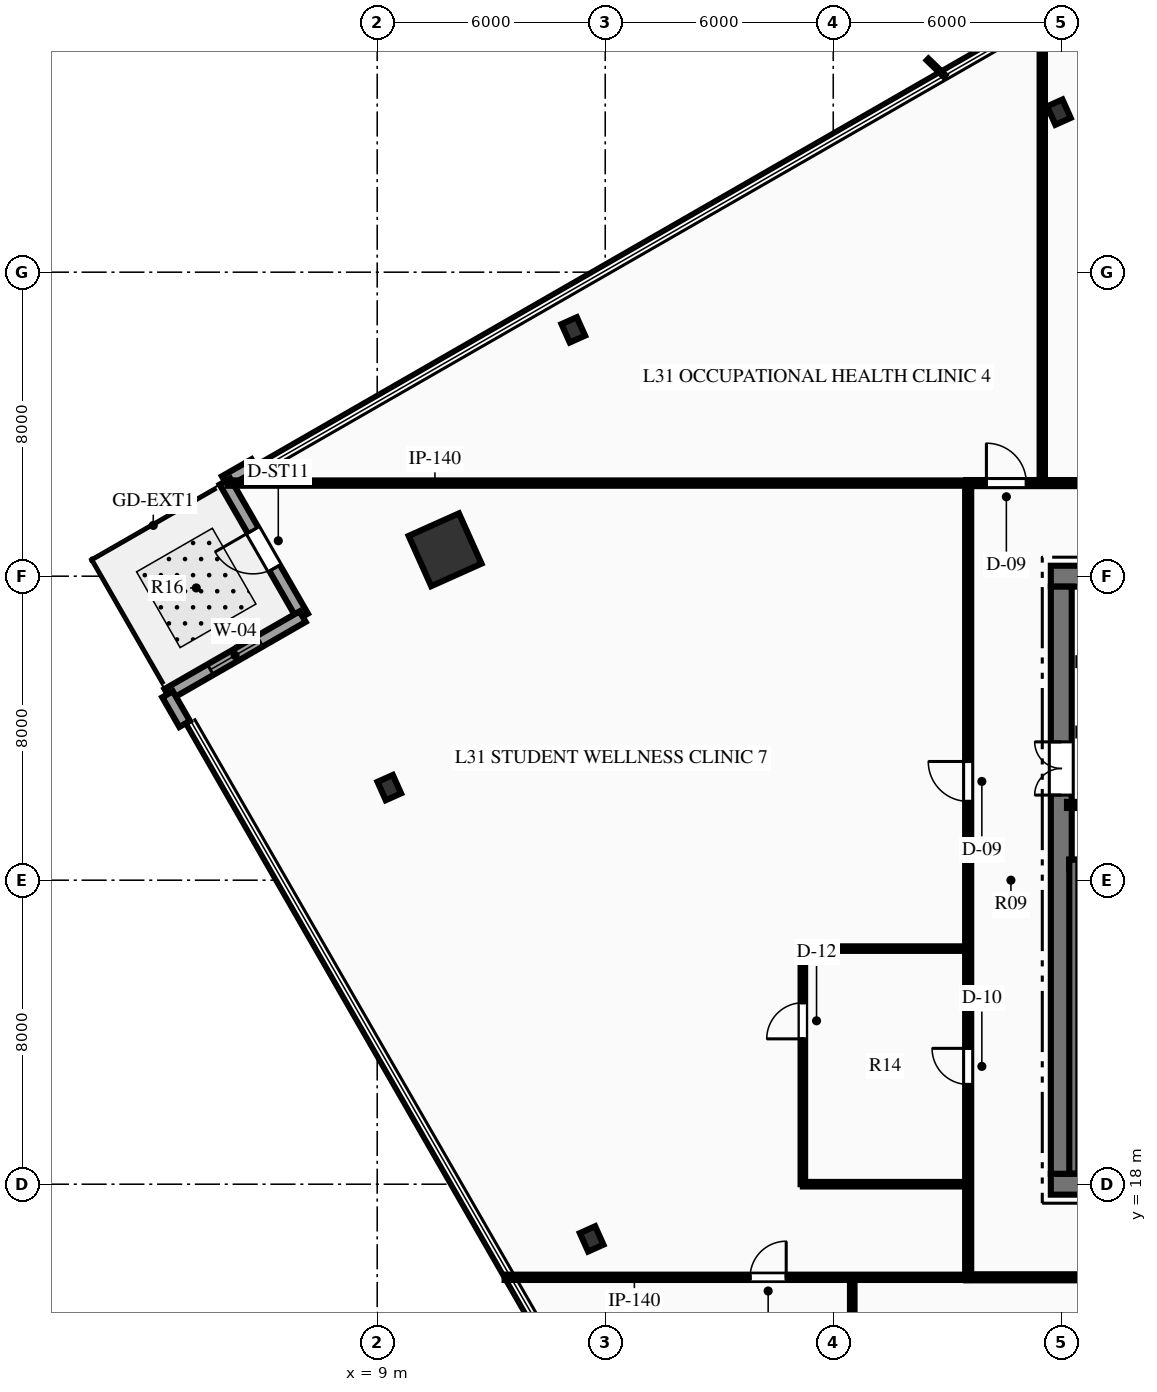
"""IFC4 building model, lengths in metres.
Left out: names, types, materials, properties, quantities, classifications, styles, units other than length and angle.
Written with IfcOpenShell. Run it as: python <this file> out.ifc"""

import sys

from ifc_helpers import new_model, si_unit, direction, frame, frame_2d, origin, origin_2d, place, context, subcontext, project, spatial, rectangle, hollow_rectangle, i_section, extrude, element, fill, save


model = new_model("IFC4")
c1 = context("Model", 3, precision=1e-05, world=origin(), true_north=direction((0.0, 1.0)))
c2 = subcontext(c1, "Body", "Model", "MODEL_VIEW")
j1 = project(units=[si_unit("LENGTHUNIT", "METRE"), si_unit("PLANEANGLEUNIT", "RADIAN")], contexts=[c1])
p1 = place(None, origin())
s1 = spatial("IfcSite", under=j1, at=p1, CompositionType="ELEMENT")
p2 = place(p1, origin())
s2 = spatial("IfcBuilding", under=s1, at=p2, CompositionType="ELEMENT")
p3 = place(p2, frame((0.0, 0.0, 127.95)))
s3 = spatial("IfcBuildingStorey", under=s2, at=p3, CompositionType="ELEMENT", Elevation=127.95)
p4 = place(p3, frame((26.725, 18.0, 0.0), z_axis=(0.0, 0.0, 1.0), x_axis=(1.0, 0.0, 0.0)))
e1 = element("IfcWall", 1, at=p4, inside=s3, PredefinedType="SHEAR", context=c2, shape_type="SweptSolid", body=[
    extrude(rectangle(XDim=18.55, YDim=0.55, at=frame_2d((9.275, 0.0))), origin(), (0.0, 0.0, 1.0), 3.75),
])
p5 = place(p4, frame((7.375, 0.0, 0.0)))
e2 = element("IfcOpeningElement", 2, at=p5, cuts=e1, PredefinedType="OPENING", context=c2, shape_type="SweptSolid", body=[
    extrude(rectangle(XDim=1.1, YDim=2.15, at=frame_2d((0.55, 1.075))), frame((0.0, 0.285, 0.0), z_axis=(0.0, -1.0, 0.0), x_axis=(1.0, 0.0, 0.0)), (0.0, 0.0, 1.0), 0.57),
])
p6 = place(p4, frame((10.075, 0.0, 0.0)))
e3 = element("IfcOpeningElement", 3, at=p6, cuts=e1, PredefinedType="OPENING", context=c2, shape_type="SweptSolid", body=[
    extrude(rectangle(XDim=1.1, YDim=2.15, at=frame_2d((0.55, 1.075))), frame((0.0, 0.285, 0.0), z_axis=(0.0, -1.0, 0.0), x_axis=(1.0, 0.0, 0.0)), (0.0, 0.0, 1.0), 0.57),
])
p7 = place(p3, frame((26.725, 34.0, 0.0), z_axis=(0.0, 0.0, 1.0), x_axis=(1.0, 0.0, 0.0)))
e4 = element("IfcWall", 4, at=p7, inside=s3, PredefinedType="SHEAR", context=c2, shape_type="SweptSolid", body=[
    extrude(rectangle(XDim=18.55, YDim=0.55, at=frame_2d((9.275, 0.0))), origin(), (0.0, 0.0, 1.0), 3.75),
])
p8 = place(p7, frame((1.24, 0.0, 0.0)))
e5 = element("IfcOpeningElement", 5, at=p8, cuts=e4, PredefinedType="OPENING", context=c2, shape_type="SweptSolid", body=[
    extrude(rectangle(XDim=1.1, YDim=2.15, at=frame_2d((0.55, 1.075))), frame((0.0, 0.285, 0.0), z_axis=(0.0, -1.0, 0.0), x_axis=(1.0, 0.0, 0.0)), (0.0, 0.0, 1.0), 0.57),
])
p9 = place(p7, frame((3.49, 0.0, 0.0)))
e6 = element("IfcOpeningElement", 6, at=p9, cuts=e4, PredefinedType="OPENING", context=c2, shape_type="SweptSolid", body=[
    extrude(rectangle(XDim=1.1, YDim=2.15, at=frame_2d((0.55, 1.075))), frame((0.0, 0.285, 0.0), z_axis=(0.0, -1.0, 0.0), x_axis=(1.0, 0.0, 0.0)), (0.0, 0.0, 1.0), 0.57),
])
p10 = place(p7, frame((13.96, 0.0, 0.0)))
e7 = element("IfcOpeningElement", 7, at=p10, cuts=e4, PredefinedType="OPENING", context=c2, shape_type="SweptSolid", body=[
    extrude(rectangle(XDim=1.1, YDim=2.15, at=frame_2d((0.55, 1.075))), frame((0.0, 0.285, 0.0), z_axis=(0.0, -1.0, 0.0), x_axis=(1.0, 0.0, 0.0)), (0.0, 0.0, 1.0), 0.57),
])
p11 = place(p7, frame((16.21, 0.0, 0.0)))
e8 = element("IfcOpeningElement", 8, at=p11, cuts=e4, PredefinedType="OPENING", context=c2, shape_type="SweptSolid", body=[
    extrude(rectangle(XDim=1.1, YDim=2.15, at=frame_2d((0.55, 1.075))), frame((0.0, 0.285, 0.0), z_axis=(0.0, -1.0, 0.0), x_axis=(1.0, 0.0, 0.0)), (0.0, 0.0, 1.0), 0.57),
])
p12 = place(p3, frame((27.0, 18.275, 0.0), z_axis=(0.0, 0.0, 1.0), x_axis=(0.0, 1.0, 0.0)))
e9 = element("IfcWall", 9, at=p12, inside=s3, PredefinedType="SHEAR", context=c2, shape_type="SweptSolid", body=[
    extrude(rectangle(XDim=15.45, YDim=0.55, at=frame_2d((7.725, 0.0))), origin(), (0.0, 0.0, 1.0), 3.75),
])
p13 = place(p12, frame((9.965, 0.0, 0.0)))
e10 = element("IfcOpeningElement", 10, at=p13, cuts=e9, PredefinedType="OPENING", context=c2, shape_type="SweptSolid", body=[
    extrude(rectangle(XDim=1.4, YDim=2.2, at=frame_2d((0.7, 1.1))), frame((0.0, 0.285, 0.0), z_axis=(0.0, -1.0, 0.0), x_axis=(1.0, 0.0, 0.0)), (0.0, 0.0, 1.0), 0.57),
])
p14 = place(p3, frame((27.21, 26.42, 0.0), z_axis=(0.0, 0.0, 1.0), x_axis=(1.0, 0.0, 0.0)))
e11 = element("IfcWall", 11, at=p14, inside=s3, PredefinedType="SHEAR", context=c2, shape_type="SweptSolid", body=[
    extrude(rectangle(XDim=3.98, YDim=0.24, at=frame_2d((1.99, 0.0))), origin(), (0.0, 0.0, 1.0), 3.75),
])
p15 = place(p3, frame((27.33, 18.28, 0.0), z_axis=(0.0, 0.0, 1.0), x_axis=(0.0, 1.0, 0.0)))
e12 = element("IfcWall", 12, at=p15, inside=s3, PredefinedType="SHEAR", context=c2, shape_type="SweptSolid", body=[
    extrude(rectangle(XDim=8.26, YDim=0.24, at=frame_2d((4.13, 0.0))), origin(), (0.0, 0.0, 1.0), 3.75),
])
p16 = place(p3, frame((10.786, 34.695, 0.0), z_axis=(0.0, 0.0, 1.0), x_axis=(0.912477494148, 0.409126902895, 0.0)))
e13 = element("IfcColumn", 13, at=p16, inside=s3, PredefinedType="COLUMN", context=c2, shape_type="SweptSolid", body=[
    extrude(hollow_rectangle(XDim=1.45, YDim=1.45, WallThickness=0.07, at=origin_2d()), origin(), (0.0, 0.0, 1.0), 3.75),
])
for number, where, z_axis, x_axis in (
    (14, (26.938, 46.211, 0.0), (0.0, 0.0, 1.0), (0.912, 0.409, 0.0)),
    (15, (14.159, 40.482, 0.0), (0.0, 0.0, 1.0), (0.912, 0.409, 0.0)),
    (16, (9.318, 28.437, 0.0), (0.0, 0.0, 1.0), (0.912, 0.409, 0.0)),
    (17, (14.643, 16.561, 0.0), (0.0, 0.0, 1.0), (0.912, 0.409, 0.0)),
):
    element("IfcColumn", number, at=place(p3, frame(where, z_axis=z_axis, x_axis=x_axis)), inside=s3, PredefinedType="COLUMN", context=c2, shape_type="SweptSolid", body=[
        extrude(i_section(OverallWidth=0.442, OverallDepth=0.531, WebThickness=0.066, FlangeThickness=0.106, at=origin_2d()), origin(), (0.0, 0.0, 1.0), 3.75),
    ])
p17 = place(p3, frame((4.994, 36.49, 0.0), z_axis=(0.0, 0.0, 1.0), x_axis=(0.866803702948, 0.498649516751, 0.0)))
e18 = element("IfcWall", 18, at=p17, inside=s3, PredefinedType="STANDARD", context=c2, shape_type="SweptSolid", body=[
    extrude(rectangle(XDim=0.9, YDim=0.32, at=frame_2d((0.45, 0.0))), origin(), (0.0, 0.0, 1.0), 3.4),
])
p18 = place(p3, frame((7.038, 32.936, 0.0), z_axis=(0.0, 0.0, 1.0), x_axis=(-0.498477837049, 0.866902443168, 0.0)))
e19 = element("IfcWall", 19, at=p18, inside=s3, PredefinedType="STANDARD", context=c2, shape_type="SweptSolid", body=[
    extrude(rectangle(XDim=4.1, YDim=0.32, at=frame_2d((2.05, 0.0))), origin(), (0.0, 0.0, 1.0), 3.4),
])
p19 = place(p18, frame((1.475, 0.0, 0.0)))
e20 = element("IfcOpeningElement", 20, at=p19, cuts=e19, PredefinedType="OPENING", context=c2, shape_type="SweptSolid", body=[
    extrude(rectangle(XDim=1.15, YDim=2.2, at=frame_2d((0.575, 1.1))), frame((0.0, 0.17, 0.0), z_axis=(0.0, -1.0, 0.0), x_axis=(1.0, 0.0, 0.0)), (0.0, 0.0, 1.0), 0.34),
])
p20 = place(p3, frame((3.483, 30.892, 0.0), z_axis=(0.0, 0.0, 1.0), x_axis=(0.866902443168, 0.498477837049, 0.0)))
e21 = element("IfcWall", 21, at=p20, inside=s3, PredefinedType="STANDARD", context=c2, shape_type="SweptSolid", body=[
    extrude(rectangle(XDim=4.1, YDim=0.32, at=frame_2d((2.05, 0.0))), origin(), (0.0, 0.0, 1.0), 3.4),
])
p21 = place(p20, frame((1.3, 0.0, 0.85)))
e22 = element("IfcOpeningElement", 22, at=p21, cuts=e21, PredefinedType="OPENING", context=c2, shape_type="SweptSolid", body=[
    extrude(rectangle(XDim=1.5, YDim=2.1, at=frame_2d((0.75, 1.05))), frame((0.0, 0.17, 0.0), z_axis=(0.0, -1.0, 0.0), x_axis=(1.0, 0.0, 0.0)), (0.0, 0.0, 1.0), 0.34),
])
p22 = place(p3, frame((3.932, 30.112, 0.0), z_axis=(0.0, 0.0, 1.0), x_axis=(-0.498328409329, 0.866988348512, 0.0)))
e23 = element("IfcWall", 23, at=p22, inside=s3, PredefinedType="STANDARD", context=c2, shape_type="SweptSolid", body=[
    extrude(rectangle(XDim=0.9, YDim=0.32, at=frame_2d((0.45, 0.0))), origin(), (0.0, 0.0, 1.0), 3.4),
])
p23 = place(p3, frame((27.15, 27.98, 0.0), z_axis=(0.0, 0.0, 1.0), x_axis=(1.0, 0.0, 0.0)))
e24 = element("IfcWall", 24, at=p23, inside=s3, PredefinedType="PARTITIONING", context=c2, shape_type="SweptSolid", body=[
    extrude(rectangle(XDim=4.05, YDim=0.16, at=frame_2d((2.025, 0.0))), origin(), (0.0, 0.0, 1.0), 3.4),
])
p24 = place(p23, frame((1.625, 0.0, 0.0)))
e25 = element("IfcOpeningElement", 25, at=p24, cuts=e24, PredefinedType="OPENING", context=c2, shape_type="SweptSolid", body=[
    extrude(rectangle(XDim=0.95, YDim=2.15, at=frame_2d((0.475, 1.075))), frame((0.0, 0.09, 0.0), z_axis=(0.0, -1.0, 0.0), x_axis=(1.0, 0.0, 0.0)), (0.0, 0.0, 1.0), 0.18),
])
p25 = place(p3, frame((24.5, 15.55, 0.0), z_axis=(0.0, 0.0, 1.0), x_axis=(1.0, 0.0, 0.0)))
e26 = element("IfcWall", 26, at=p25, inside=s3, PredefinedType="PARTITIONING", context=c2, shape_type="SweptSolid", body=[
    extrude(rectangle(XDim=23.0, YDim=0.16, at=frame_2d((11.5, 0.0))), origin(), (0.0, 0.0, 1.0), 3.4),
])
p26 = place(p25, frame((16.15, 0.0, 0.0)))
e27 = element("IfcOpeningElement", 27, at=p26, cuts=e26, PredefinedType="OPENING", context=c2, shape_type="SweptSolid", body=[
    extrude(rectangle(XDim=0.9, YDim=2.15, at=frame_2d((0.45, 1.075))), frame((0.0, 0.09, 0.0), z_axis=(0.0, -1.0, 0.0), x_axis=(1.0, 0.0, 0.0)), (0.0, 0.0, 1.0), 0.18),
])
p27 = place(p25, frame((18.45, 0.0, 0.0)))
e28 = element("IfcOpeningElement", 28, at=p27, cuts=e26, PredefinedType="OPENING", context=c2, shape_type="SweptSolid", body=[
    extrude(rectangle(XDim=0.9, YDim=2.15, at=frame_2d((0.45, 1.075))), frame((0.0, 0.09, 0.0), z_axis=(0.0, -1.0, 0.0), x_axis=(1.0, 0.0, 0.0)), (0.0, 0.0, 1.0), 0.18),
])
p28 = place(p25, frame((20.7, 0.0, 0.0)))
e29 = element("IfcOpeningElement", 29, at=p28, cuts=e26, PredefinedType="OPENING", context=c2, shape_type="SweptSolid", body=[
    extrude(rectangle(XDim=1.0, YDim=2.15, at=frame_2d((0.5, 1.075))), frame((0.0, 0.09, 0.0), z_axis=(0.0, -1.0, 0.0), x_axis=(1.0, 0.0, 0.0)), (0.0, 0.0, 1.0), 0.18),
])
p29 = place(p25, frame((3.781, 0.0, 0.0)))
e30 = element("IfcOpeningElement", 30, at=p29, cuts=e26, PredefinedType="OPENING", context=c2, shape_type="SweptSolid", body=[
    extrude(rectangle(XDim=1.05, YDim=2.15, at=frame_2d((0.525, 1.075))), frame((0.0, 0.09, 0.0), z_axis=(0.0, -1.0, 0.0), x_axis=(1.0, 0.0, 0.0)), (0.0, 0.0, 1.0), 0.18),
])
p30 = place(p25, frame((8.373, 0.0, 0.0)))
e31 = element("IfcOpeningElement", 31, at=p30, cuts=e26, PredefinedType="OPENING", context=c2, shape_type="SweptSolid", body=[
    extrude(rectangle(XDim=1.05, YDim=2.15, at=frame_2d((0.525, 1.075))), frame((0.0, 0.09, 0.0), z_axis=(0.0, -1.0, 0.0), x_axis=(1.0, 0.0, 0.0)), (0.0, 0.0, 1.0), 0.18),
])
p31 = place(p3, frame((24.5, 36.45, 0.0), z_axis=(0.0, 0.0, 1.0), x_axis=(1.0, 0.0, 0.0)))
e32 = element("IfcWall", 32, at=p31, inside=s3, PredefinedType="PARTITIONING", context=c2, shape_type="SweptSolid", body=[
    extrude(rectangle(XDim=23.0, YDim=0.16, at=frame_2d((11.5, 0.0))), origin(), (0.0, 0.0, 1.0), 3.4),
])
p32 = place(p31, frame((0.53, 0.0, 0.0)))
e33 = element("IfcOpeningElement", 33, at=p32, cuts=e32, PredefinedType="OPENING", context=c2, shape_type="SweptSolid", body=[
    extrude(rectangle(XDim=1.05, YDim=2.15, at=frame_2d((0.525, 1.075))), frame((0.0, 0.09, 0.0), z_axis=(0.0, -1.0, 0.0), x_axis=(1.0, 0.0, 0.0)), (0.0, 0.0, 1.0), 0.18),
])
p33 = place(p31, frame((9.755, 0.0, 0.0)))
e34 = element("IfcOpeningElement", 34, at=p33, cuts=e32, PredefinedType="OPENING", context=c2, shape_type="SweptSolid", body=[
    extrude(rectangle(XDim=1.05, YDim=2.15, at=frame_2d((0.525, 1.075))), frame((0.0, 0.09, 0.0), z_axis=(0.0, -1.0, 0.0), x_axis=(1.0, 0.0, 0.0)), (0.0, 0.0, 1.0), 0.18),
])
p34 = place(p31, frame((16.129, 0.0, 0.0)))
e35 = element("IfcOpeningElement", 35, at=p34, cuts=e32, PredefinedType="OPENING", context=c2, shape_type="SweptSolid", body=[
    extrude(rectangle(XDim=1.05, YDim=2.15, at=frame_2d((0.525, 1.075))), frame((0.0, 0.09, 0.0), z_axis=(0.0, -1.0, 0.0), x_axis=(1.0, 0.0, 0.0)), (0.0, 0.0, 1.0), 0.18),
])
p35 = place(p3, frame((24.55, 15.55, 0.0), z_axis=(0.0, 0.0, 1.0), x_axis=(0.0, 1.0, 0.0)))
e36 = element("IfcWall", 36, at=p35, inside=s3, PredefinedType="PARTITIONING", context=c2, shape_type="SweptSolid", body=[
    extrude(rectangle(XDim=20.9, YDim=0.16, at=frame_2d((10.45, 0.0))), origin(), (0.0, 0.0, 1.0), 3.4),
])
p36 = place(p35, frame((5.075, 0.0, 0.0)))
e37 = element("IfcOpeningElement", 37, at=p36, cuts=e36, PredefinedType="OPENING", context=c2, shape_type="SweptSolid", body=[
    extrude(rectangle(XDim=0.95, YDim=2.15, at=frame_2d((0.475, 1.075))), frame((0.0, 0.09, 0.0), z_axis=(0.0, -1.0, 0.0), x_axis=(1.0, 0.0, 0.0)), (0.0, 0.0, 1.0), 0.18),
])
p37 = place(p35, frame((12.524, 0.0, 0.0)))
e38 = element("IfcOpeningElement", 38, at=p37, cuts=e36, PredefinedType="OPENING", context=c2, shape_type="SweptSolid", body=[
    extrude(rectangle(XDim=1.05, YDim=2.15, at=frame_2d((0.525, 1.075))), frame((0.0, 0.09, 0.0), z_axis=(0.0, -1.0, 0.0), x_axis=(1.0, 0.0, 0.0)), (0.0, 0.0, 1.0), 0.18),
])
p38 = place(p3, frame((12.352, 15.55, 0.0), z_axis=(0.0, 0.0, 1.0), x_axis=(1.0, 0.0, 0.0)))
e39 = element("IfcWall", 39, at=p38, inside=s3, PredefinedType="PARTITIONING", context=c2, shape_type="SweptSolid", body=[
    extrude(rectangle(XDim=12.198, YDim=0.14, at=frame_2d((6.099, 0.0))), origin(), (0.0, 0.0, 1.0), 3.4),
])
p39 = place(p38, frame((6.46, 0.0, 0.0)))
e40 = element("IfcOpeningElement", 40, at=p39, cuts=e39, PredefinedType="OPENING", context=c2, shape_type="SweptSolid", body=[
    extrude(rectangle(XDim=0.95, YDim=2.15, at=frame_2d((0.475, 1.075))), frame((0.0, 0.08, 0.0), z_axis=(0.0, -1.0, 0.0), x_axis=(1.0, 0.0, 0.0)), (0.0, 0.0, 1.0), 0.16),
])
p40 = place(p3, frame((5.063, 36.45, 0.0), z_axis=(0.0, 0.0, 1.0), x_axis=(1.0, 0.0, 0.0)))
e41 = element("IfcWall", 41, at=p40, inside=s3, PredefinedType="PARTITIONING", context=c2, shape_type="SweptSolid", body=[
    extrude(rectangle(XDim=19.487, YDim=0.14, at=frame_2d((9.744, 0.0))), origin(), (0.0, 0.0, 1.0), 3.4),
])
p41 = place(p3, frame((21.5, -0.36, 0.0), z_axis=(0.0, 0.0, 1.0), x_axis=(0.0, 1.0, 0.0)))
e42 = element("IfcWall", 42, at=p41, inside=s3, PredefinedType="PARTITIONING", context=c2, shape_type="SweptSolid", body=[
    extrude(rectangle(XDim=15.91, YDim=0.12, at=frame_2d((7.955, 0.0))), origin(), (0.0, 0.0, 1.0), 3.4),
])
p42 = place(p3, frame((26.5, 36.45, 0.0), z_axis=(0.0, 0.0, 1.0), x_axis=(0.0, 1.0, 0.0)))
e43 = element("IfcWall", 43, at=p42, inside=s3, PredefinedType="PARTITIONING", context=c2, shape_type="SweptSolid", body=[
    extrude(rectangle(XDim=12.361, YDim=0.14, at=frame_2d((6.18, 0.0))), origin(), (0.0, 0.0, 1.0), 3.4),
])
p43 = place(p3, frame((20.2, 18.0, 0.0), z_axis=(0.0, 0.0, 1.0), x_axis=(1.0, 0.0, 0.0)))
e44 = element("IfcWall", 44, at=p43, inside=s3, PredefinedType="PARTITIONING", context=c2, shape_type="SweptSolid", body=[
    extrude(rectangle(XDim=4.35, YDim=0.12, at=frame_2d((2.175, 0.0))), origin(), (0.0, 0.0, 1.0), 2.699),
])
p44 = place(p3, frame((20.2, 18.0, 0.0), z_axis=(0.0, 0.0, 1.0), x_axis=(0.0, 1.0, 0.0)))
e45 = element("IfcWall", 45, at=p44, inside=s3, PredefinedType="PARTITIONING", context=c2, shape_type="SweptSolid", body=[
    extrude(rectangle(XDim=6.2, YDim=0.12, at=frame_2d((3.1, 0.0))), origin(), (0.0, 0.0, 1.0), 3.4),
])
p45 = place(p44, frame((3.825, 0.0, 0.0)))
e46 = element("IfcOpeningElement", 46, at=p45, cuts=e45, PredefinedType="OPENING", context=c2, shape_type="SweptSolid", body=[
    extrude(rectangle(XDim=0.95, YDim=2.15, at=frame_2d((0.475, 1.075))), frame((0.0, 0.07, 0.0), z_axis=(0.0, -1.0, 0.0), x_axis=(1.0, 0.0, 0.0)), (0.0, 0.0, 1.0), 0.14),
])
p46 = place(p3, frame((20.2, 24.2, 0.0), z_axis=(0.0, 0.0, 1.0), x_axis=(1.0, 0.0, 0.0)))
e47 = element("IfcWall", 47, at=p46, inside=s3, PredefinedType="PARTITIONING", context=c2, shape_type="SweptSolid", body=[
    extrude(rectangle(XDim=4.35, YDim=0.12, at=frame_2d((2.175, 0.0))), origin(), (0.0, 0.0, 1.0), 3.4),
])
p47 = place(p19, origin())
e48 = element("IfcDoor", 48, at=p47, inside=s3, OperationType="SINGLE_SWING_RIGHT", PredefinedType="DOOR", context=c2, shape_type="SweptSolid", body=[
    extrude(rectangle(XDim=1.15, YDim=2.2, at=frame_2d((0.575, 1.1))), frame((0.0, 0.025, 0.0), z_axis=(0.0, -1.0, 0.0), x_axis=(1.0, 0.0, 0.0)), (0.0, 0.0, 1.0), 0.05),
])
fill(e20, e48)
p48 = place(p21, origin())
e49 = element("IfcWindow", 49, at=p48, inside=s3, PartitioningType="SINGLE_PANEL", PredefinedType="WINDOW", context=c2, shape_type="SweptSolid", body=[
    extrude(rectangle(XDim=1.5, YDim=2.1, at=frame_2d((0.75, 1.05))), frame((0.0, 0.03, 0.0), z_axis=(0.0, -1.0, 0.0), x_axis=(1.0, 0.0, 0.0)), (0.0, 0.0, 1.0), 0.06),
])
fill(e22, e49)
p49 = place(p13, origin())
e50 = element("IfcDoor", 50, at=p49, inside=s3, OperationType="DOUBLE_DOOR_SINGLE_SWING", PredefinedType="DOOR", context=c2, shape_type="SweptSolid", body=[
    extrude(rectangle(XDim=1.4, YDim=2.2, at=frame_2d((0.7, 1.1))), frame((0.0, 0.025, 0.0), z_axis=(0.0, -1.0, 0.0), x_axis=(1.0, 0.0, 0.0)), (0.0, 0.0, 1.0), 0.05),
])
fill(e10, e50)
p50 = place(p36, origin())
e51 = element("IfcDoor", 51, at=p50, inside=s3, OperationType="SINGLE_SWING_RIGHT", PredefinedType="DOOR", context=c2, shape_type="SweptSolid", body=[
    extrude(rectangle(XDim=0.95, YDim=2.15, at=frame_2d((0.475, 1.075))), frame((0.0, 0.025, 0.0), z_axis=(0.0, -1.0, 0.0), x_axis=(1.0, 0.0, 0.0)), (0.0, 0.0, 1.0), 0.05),
])
fill(e37, e51)
p51 = place(p45, origin())
e52 = element("IfcDoor", 52, at=p51, inside=s3, OperationType="SINGLE_SWING_LEFT", PredefinedType="DOOR", context=c2, shape_type="SweptSolid", body=[
    extrude(rectangle(XDim=0.95, YDim=2.15, at=frame_2d((0.475, 1.075))), frame((0.0, 0.025, 0.0), z_axis=(0.0, -1.0, 0.0), x_axis=(1.0, 0.0, 0.0)), (0.0, 0.0, 1.0), 0.05),
])
fill(e46, e52)
p52 = place(p39, origin())
e53 = element("IfcDoor", 53, at=p52, inside=s3, OperationType="SINGLE_SWING_RIGHT", PredefinedType="DOOR", context=c2, shape_type="SweptSolid", body=[
    extrude(rectangle(XDim=0.95, YDim=2.15, at=frame_2d((0.475, 1.075))), frame((0.0, 0.025, 0.0), z_axis=(0.0, -1.0, 0.0), x_axis=(1.0, 0.0, 0.0)), (0.0, 0.0, 1.0), 0.05),
])
fill(e40, e53)
p53 = place(p32, origin())
e54 = element("IfcDoor", 54, at=p53, inside=s3, OperationType="SINGLE_SWING_LEFT", PredefinedType="DOOR", context=c2, shape_type="SweptSolid", body=[
    extrude(rectangle(XDim=1.05, YDim=2.15, at=frame_2d((0.525, 1.075))), frame((0.0, 0.025, 0.0), z_axis=(0.0, -1.0, 0.0), x_axis=(1.0, 0.0, 0.0)), (0.0, 0.0, 1.0), 0.05),
])
fill(e33, e54)
p54 = place(p37, origin())
e55 = element("IfcDoor", 55, at=p54, inside=s3, OperationType="SINGLE_SWING_RIGHT", PredefinedType="DOOR", context=c2, shape_type="SweptSolid", body=[
    extrude(rectangle(XDim=1.05, YDim=2.15, at=frame_2d((0.525, 1.075))), frame((0.0, 0.025, 0.0), z_axis=(0.0, -1.0, 0.0), x_axis=(1.0, 0.0, 0.0)), (0.0, 0.0, 1.0), 0.05),
])
fill(e38, e55)
save(model, sys.argv[1])
